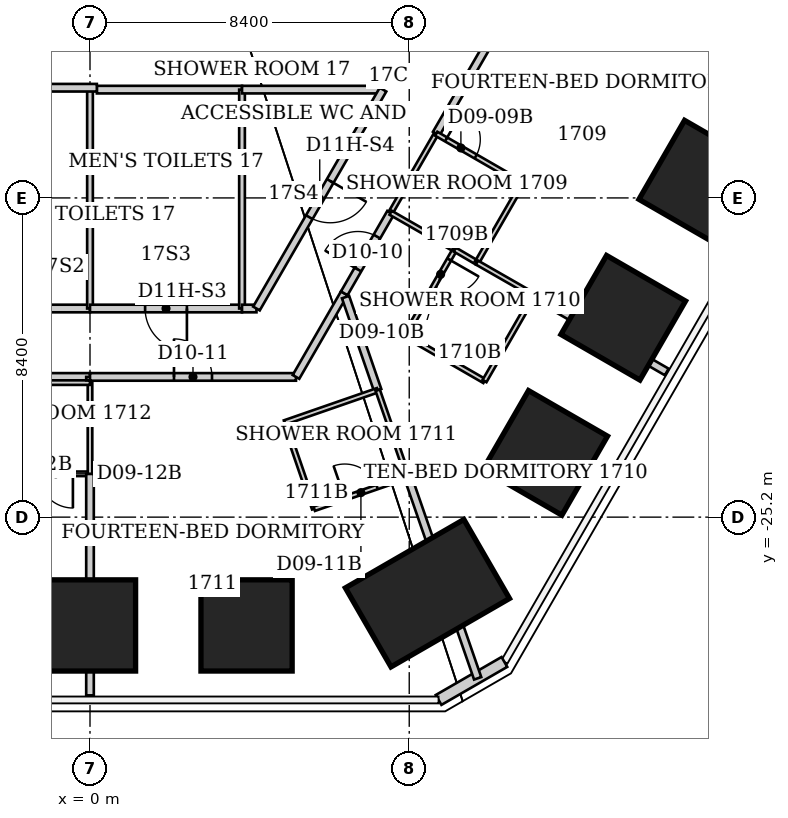
"""IFC4 building model, lengths in metres.
Left out: names, types, materials, properties, quantities, classifications, styles, units other than length and angle.
Written with IfcOpenShell. Run it as: python <this file> out.ifc"""

import sys

from ifc_helpers import new_model, si_unit, direction, frame, frame_2d, origin, origin_2d, place, context, subcontext, project, spatial, rectangle, extrude, element, fill, save


model = new_model("IFC4")
c1 = context("Model", 3, precision=1e-05, world=origin(), true_north=direction((0.0, 1.0)))
c2 = subcontext(c1, "Body", "Model", "MODEL_VIEW")
j1 = project(units=[si_unit("LENGTHUNIT", "METRE"), si_unit("PLANEANGLEUNIT", "RADIAN")], contexts=[c1])
p1 = place(None, origin())
s1 = spatial("IfcSite", under=j1, at=p1, CompositionType="ELEMENT")
p2 = place(p1, origin())
s2 = spatial("IfcBuilding", under=s1, at=p2, CompositionType="ELEMENT")
p3 = place(p2, frame((0.0, 0.0, 72.4)))
s3 = spatial("IfcBuildingStorey", under=s2, at=p3, CompositionType="ELEMENT", Elevation=72.4)
p4 = place(p3, frame((16.084, -16.398, 0.0), z_axis=(-0.026707189651, 0.027220789452, 0.999272612775), x_axis=(0.865695316087, -0.499221464256, 0.036736212807)))
e1 = element("IfcColumn", 1, at=p4, inside=s3, PredefinedType="COLUMN", context=c2, shape_type="SweptSolid", body=[
    extrude(rectangle(XDim=2.4, YDim=2.4, at=origin_2d()), origin(), (0.0, 0.0, 1.0), 3.803),
])
p5 = place(p3, frame((14.031, -19.953, 0.0), z_axis=(-0.02330242081, 0.033124102308, 0.999179558954), x_axis=(0.865853874056, -0.498946587993, 0.036733787066)))
e2 = element("IfcColumn", 2, at=p5, inside=s3, PredefinedType="COLUMN", context=c2, shape_type="SweptSolid", body=[
    extrude(rectangle(XDim=2.4, YDim=2.4, at=origin_2d()), origin(), (0.0, 0.0, 1.0), 3.803),
])
p6 = place(p3, frame((11.978, -23.509, 0.0), z_axis=(-0.019833251954, 0.038960465812, 0.999043905052), x_axis=(0.865703965576, -0.49921248457, 0.036654320816)))
e3 = element("IfcColumn", 3, at=p6, inside=s3, PredefinedType="COLUMN", context=c2, shape_type="SweptSolid", body=[
    extrude(rectangle(XDim=2.4, YDim=2.4, at=origin_2d()), origin(), (0.0, 0.0, 1.0), 3.804),
])
p7 = place(p3, frame((8.879, -27.202, 0.0), z_axis=(-0.014824030832, 0.0454346919, 0.998857315577), x_axis=(0.499731843942, -0.864917167509, 0.046758715743)))
e4 = element("IfcColumn", 4, at=p7, inside=s3, PredefinedType="COLUMN", context=c2, shape_type="SweptSolid", body=[
    extrude(rectangle(XDim=2.4, YDim=3.6, at=origin_2d()), origin(), (0.0, 0.0, 1.0), 3.804),
])
p8 = place(p3, frame((4.119, -28.05, 0.0), z_axis=(-0.006738664901, 0.045822921324, 0.998926849312), x_axis=(-0.00011331945, -0.9989495591, 0.045823198629)))
e5 = element("IfcColumn", 5, at=p8, inside=s3, PredefinedType="COLUMN", context=c2, shape_type="SweptSolid", body=[
    extrude(rectangle(XDim=2.4, YDim=2.4, at=origin_2d()), origin(), (0.0, 0.0, 1.0), 3.804),
])
p9 = place(p3, frame((0.0, -28.05, 0.0), z_axis=(0.0, 0.04588800593, 0.99894659062), x_axis=(0.0, -0.99894659062, 0.04588800593)))
e6 = element("IfcColumn", 6, at=p9, inside=s3, PredefinedType="COLUMN", context=c2, shape_type="SweptSolid", body=[
    extrude(rectangle(XDim=2.4, YDim=2.4, at=origin_2d()), origin(), (0.0, 0.0, 1.0), 3.804),
])
p10 = place(p3, frame((10.904, -29.011, 0.0), z_axis=(0.0, 0.0, 1.0), x_axis=(-0.866010750942, -0.50002537861, 0.0)))
e7 = element("IfcWall", 7, at=p10, inside=s3, PredefinedType="SOLIDWALL", context=c2, shape_type="SweptSolid", body=[
    extrude(rectangle(XDim=2.0, YDim=0.3, at=frame_2d((1.0, 0.0))), origin(), (0.0, 0.0, 1.0), 3.64),
])
p11 = place(p3, frame((-5.42, -21.51, 0.0), z_axis=(0.0, 0.0, 1.0), x_axis=(1.0, 0.0, 0.0)))
e8 = element("IfcWall", 8, at=p11, inside=s3, PredefinedType="PARTITIONING", context=c2, shape_type="SweptSolid", body=[
    extrude(rectangle(XDim=5.42, YDim=0.2, at=frame_2d((2.71, 0.0))), origin(), (0.0, 0.0, 1.0), 3.64),
])
p12 = place(p11, frame((1.71, 0.0, 0.0)))
e9 = element("IfcOpeningElement", 9, at=p12, cuts=e8, PredefinedType="OPENING", context=c2, shape_type="SweptSolid", body=[
    extrude(rectangle(XDim=1.0, YDim=2.13, at=frame_2d((0.5, 1.065))), frame((0.0, 0.1, 0.0), z_axis=(0.0, -1.0, 0.0), x_axis=(1.0, 0.0, 0.0)), (0.0, 0.0, 1.0), 0.2),
])
p13 = place(p3, frame((-2.6, -24.06, 0.0), z_axis=(0.0, 0.0, 1.0), x_axis=(1.0, 0.0, 0.0)))
e10 = element("IfcWall", 10, at=p13, inside=s3, PredefinedType="PARTITIONING", context=c2, shape_type="SweptSolid", body=[
    extrude(rectangle(XDim=2.6, YDim=0.12, at=frame_2d((1.3, 0.0))), origin(), (0.0, 0.0, 1.0), 3.64),
])
p14 = place(p13, frame((1.25, 0.0, 0.0)))
e11 = element("IfcOpeningElement", 11, at=p14, cuts=e10, PredefinedType="OPENING", context=c2, shape_type="SweptSolid", body=[
    extrude(rectangle(XDim=0.9, YDim=2.03, at=frame_2d((0.45, 1.015))), frame((0.0, 0.06, 0.0), z_axis=(0.0, -1.0, 0.0), x_axis=(1.0, 0.0, 0.0)), (0.0, 0.0, 1.0), 0.12),
])
p15 = place(p3, frame((0.0, -29.89, 0.0), z_axis=(0.0, 0.0, 1.0), x_axis=(0.0, 1.0, 0.0)))
e12 = element("IfcWall", 12, at=p15, inside=s3, PredefinedType="PARTITIONING", context=c2, shape_type="SweptSolid", body=[
    extrude(rectangle(XDim=5.83, YDim=0.2, at=frame_2d((2.915, 0.0))), origin(), (0.0, 0.0, 1.0), 2.86),
])
p16 = place(p3, frame((0.0, -24.06, 0.0), z_axis=(0.0, 0.0, 1.0), x_axis=(0.0, 1.0, 0.0)))
e13 = element("IfcWall", 13, at=p16, inside=s3, PredefinedType="PARTITIONING", context=c2, shape_type="SweptSolid", body=[
    extrude(rectangle(XDim=2.4, YDim=0.12, at=frame_2d((1.2, 0.0))), origin(), (0.0, 0.0, 1.0), 2.86),
])
p17 = place(p3, frame((0.0, -21.66, 0.0), z_axis=(0.0, 0.0, 1.0), x_axis=(-1.0, 0.0, 0.0)))
e14 = element("IfcWall", 14, at=p17, inside=s3, PredefinedType="PARTITIONING", context=c2, shape_type="SweptSolid", body=[
    extrude(rectangle(XDim=2.6, YDim=0.12, at=frame_2d((1.3, 0.0))), origin(), (0.0, 0.0, 1.0), 3.64),
])
p18 = place(p3, frame((0.0, -21.6, 0.0), z_axis=(0.0, 0.0, 1.0), x_axis=(0.0, 1.0, 0.0)))
e15 = element("IfcWall", 15, at=p18, inside=s3, PredefinedType="PARTITIONING", context=c2, shape_type="SweptSolid", body=[
    extrude(rectangle(XDim=0.09, YDim=0.2, at=frame_2d((0.045, 0.0))), origin(), (0.0, 0.0, 1.0), 3.64),
])
p19 = place(p3, frame((0.0, -21.51, 0.0), z_axis=(0.0, 0.0, 1.0), x_axis=(1.0, 0.0, 0.0)))
e16 = element("IfcWall", 16, at=p19, inside=s3, PredefinedType="PARTITIONING", context=c2, shape_type="SweptSolid", body=[
    extrude(rectangle(XDim=5.42, YDim=0.2, at=frame_2d((2.71, 0.0))), origin(), (0.0, 0.0, 1.0), 3.64),
])
p20 = place(p19, frame((2.21, 0.0, 0.0)))
e17 = element("IfcOpeningElement", 17, at=p20, cuts=e16, PredefinedType="OPENING", context=c2, shape_type="SweptSolid", body=[
    extrude(rectangle(XDim=1.0, YDim=2.13, at=frame_2d((0.5, 1.065))), frame((0.0, 0.1, 0.0), z_axis=(0.0, -1.0, 0.0), x_axis=(1.0, 0.0, 0.0)), (0.0, 0.0, 1.0), 0.2),
])
p21 = place(p3, frame((0.0, -19.71, 0.0), z_axis=(0.0, 0.0, 1.0), x_axis=(-1.0, 0.0, 0.0)))
e18 = element("IfcWall", 18, at=p21, inside=s3, PredefinedType="PARTITIONING", context=c2, shape_type="SweptSolid", body=[
    extrude(rectangle(XDim=4.0, YDim=0.2, at=frame_2d((2.0, 0.0))), origin(), (0.0, 0.0, 1.0), 3.64),
])
p22 = place(p3, frame((0.0, -13.95, 0.0), z_axis=(0.0, 0.0, 1.0), x_axis=(0.0, -1.0, 0.0)))
e19 = element("IfcWall", 19, at=p22, inside=s3, PredefinedType="PARTITIONING", context=c2, shape_type="SweptSolid", body=[
    extrude(rectangle(XDim=5.76, YDim=0.15, at=frame_2d((2.88, 0.0))), origin(), (0.0, 0.0, 1.0), 2.86),
])
p23 = place(p3, frame((0.18, -13.95, 0.0), z_axis=(0.0, 0.0, 1.0), x_axis=(1.0, 0.0, 0.0)))
e20 = element("IfcWall", 20, at=p23, inside=s3, PredefinedType="PARTITIONING", context=c2, shape_type="SweptSolid", body=[
    extrude(rectangle(XDim=3.82, YDim=0.2, at=frame_2d((1.91, 0.0))), origin(), (0.0, 0.0, 1.0), 3.64),
])
p24 = place(p3, frame((0.18, -13.9, 0.0), z_axis=(0.0, 0.0, 1.0), x_axis=(-1.0, 0.0, 0.0)))
e21 = element("IfcWall", 21, at=p24, inside=s3, PredefinedType="PARTITIONING", context=c2, shape_type="SweptSolid", body=[
    extrude(rectangle(XDim=7.97, YDim=0.2, at=frame_2d((3.985, 0.0))), origin(), (0.0, 0.0, 1.0), 3.64),
])
p25 = place(p24, frame((3.035, 0.0, 0.0)))
e22 = element("IfcOpeningElement", 22, at=p25, cuts=e21, PredefinedType="OPENING", context=c2, shape_type="SweptSolid", body=[
    extrude(rectangle(XDim=1.1, YDim=2.2, at=frame_2d((0.55, 1.1))), frame((0.0, 0.1, 0.0), z_axis=(0.0, -1.0, 0.0), x_axis=(1.0, 0.0, 0.0)), (0.0, 0.0, 1.0), 0.2),
])
p26 = place(p3, frame((4.0, -19.71, 0.0), z_axis=(0.0, 0.0, 1.0), x_axis=(-1.0, 0.0, 0.0)))
e23 = element("IfcWall", 23, at=p26, inside=s3, PredefinedType="PARTITIONING", context=c2, shape_type="SweptSolid", body=[
    extrude(rectangle(XDim=4.0, YDim=0.2, at=frame_2d((2.0, 0.0))), origin(), (0.0, 0.0, 1.0), 3.64),
])
p27 = place(p26, frame((1.45, 0.0, 0.0)))
e24 = element("IfcOpeningElement", 24, at=p27, cuts=e23, PredefinedType="OPENING", context=c2, shape_type="SweptSolid", body=[
    extrude(rectangle(XDim=1.1, YDim=2.2, at=frame_2d((0.55, 1.1))), frame((0.0, 0.1, 0.0), z_axis=(0.0, -1.0, 0.0), x_axis=(1.0, 0.0, 0.0)), (0.0, 0.0, 1.0), 0.2),
])
p28 = place(p3, frame((4.0, -13.95, 0.0), z_axis=(0.0, 0.0, 1.0), x_axis=(0.0, -1.0, 0.0)))
e25 = element("IfcWall", 25, at=p28, inside=s3, PredefinedType="PARTITIONING", context=c2, shape_type="SweptSolid", body=[
    extrude(rectangle(XDim=5.76, YDim=0.15, at=frame_2d((2.88, 0.0))), origin(), (0.0, 0.0, 1.0), 2.878),
])
p29 = place(p3, frame((4.0, -13.95, 0.0), z_axis=(0.0, 0.0, 1.0), x_axis=(1.0, 0.0, 0.0)))
e26 = element("IfcWall", 26, at=p29, inside=s3, PredefinedType="PARTITIONING", context=c2, shape_type="SweptSolid", body=[
    extrude(rectangle(XDim=3.635, YDim=0.2, at=frame_2d((1.817, 0.0))), origin(), (0.0, 0.0, 1.0), 3.64),
])
p30 = place(p3, frame((4.38, -19.71, 0.0), z_axis=(0.0, 0.0, 1.0), x_axis=(-1.0, 0.0, 0.0)))
e27 = element("IfcWall", 27, at=p30, inside=s3, PredefinedType="PARTITIONING", context=c2, shape_type="SweptSolid", body=[
    extrude(rectangle(XDim=0.38, YDim=0.2, at=frame_2d((0.19, 0.0))), origin(), (0.0, 0.0, 1.0), 3.64),
])
p31 = place(p3, frame((5.12, -22.71, 0.0), z_axis=(0.0, 0.0, 1.0), x_axis=(0.324880771143, -0.945754981241, 0.0)))
e28 = element("IfcWall", 28, at=p31, inside=s3, PredefinedType="PARTITIONING", context=c2, shape_type="SweptSolid", body=[
    extrude(rectangle(XDim=2.4, YDim=0.12, at=frame_2d((1.2, 0.0))), origin(), (0.0, 0.0, 1.0), 3.64),
])
p32 = place(p3, frame((5.42, -21.51, 0.0), z_axis=(0.0, 0.0, 1.0), x_axis=(0.499963722229, 0.866046347752, 0.0)))
e29 = element("IfcWall", 29, at=p32, inside=s3, PredefinedType="PARTITIONING", context=c2, shape_type="SweptSolid", body=[
    extrude(rectangle(XDim=2.54, YDim=0.2, at=frame_2d((1.27, 0.0))), origin(), (0.0, 0.0, 1.0), 3.64),
])
p33 = place(p3, frame((5.9, -24.98, 0.0), z_axis=(0.0, 0.0, 1.0), x_axis=(0.945165466094, 0.326591857987, 0.0)))
e30 = element("IfcWall", 30, at=p33, inside=s3, PredefinedType="PARTITIONING", context=c2, shape_type="SweptSolid", body=[
    extrude(rectangle(XDim=2.603, YDim=0.12, at=frame_2d((1.302, 0.0))), origin(), (0.0, 0.0, 1.0), 3.64),
])
p34 = place(p33, frame((0.85, 0.0, 0.0)))
e31 = element("IfcOpeningElement", 31, at=p34, cuts=e30, PredefinedType="OPENING", context=c2, shape_type="SweptSolid", body=[
    extrude(rectangle(XDim=0.9, YDim=2.03, at=frame_2d((0.45, 1.015))), frame((0.0, 0.06, 0.0), z_axis=(0.0, -1.0, 0.0), x_axis=(1.0, 0.0, 0.0)), (0.0, 0.0, 1.0), 0.12),
])
p35 = place(p3, frame((6.69, -19.31, 0.0), z_axis=(0.0, 0.0, 1.0), x_axis=(0.498748634132, 0.866746675766, 0.0)))
e32 = element("IfcWall", 32, at=p35, inside=s3, PredefinedType="PARTITIONING", context=c2, shape_type="SweptSolid", body=[
    extrude(rectangle(XDim=2.446, YDim=0.2, at=frame_2d((1.223, 0.0))), origin(), (0.0, 0.0, 1.0), 3.64),
])
p36 = place(p35, frame((0.723, 0.0, 0.0)))
e33 = element("IfcOpeningElement", 33, at=p36, cuts=e32, PredefinedType="OPENING", context=c2, shape_type="SweptSolid", body=[
    extrude(rectangle(XDim=1.0, YDim=2.13, at=frame_2d((0.5, 1.065))), frame((0.0, 0.1, 0.0), z_axis=(0.0, -1.0, 0.0), x_axis=(1.0, 0.0, 0.0)), (0.0, 0.0, 1.0), 0.2),
])
p37 = place(p3, frame((6.724, -19.409, 0.0), z_axis=(0.0, 0.0, 1.0), x_axis=(0.326182205696, -0.945306917719, 0.0)))
e34 = element("IfcWall", 34, at=p37, inside=s3, PredefinedType="PARTITIONING", context=c2, shape_type="SweptSolid", body=[
    extrude(rectangle(XDim=2.593, YDim=0.2, at=frame_2d((1.296, 0.0))), origin(), (0.0, 0.0, 1.0), 3.64),
])
p38 = place(p3, frame((7.57, -21.86, 0.0), z_axis=(0.0, 0.0, 1.0), x_axis=(-0.944782191137, -0.327698964463, 0.0)))
e35 = element("IfcWall", 35, at=p38, inside=s3, PredefinedType="PARTITIONING", context=c2, shape_type="SweptSolid", body=[
    extrude(rectangle(XDim=2.594, YDim=0.12, at=frame_2d((1.297, 0.0))), origin(), (0.0, 0.0, 1.0), 3.64),
])
p39 = place(p3, frame((7.57, -21.86, 0.0), z_axis=(0.0, 0.0, 1.0), x_axis=(0.327706459026, -0.944779591605, 0.0)))
e36 = element("IfcWall", 36, at=p39, inside=s3, PredefinedType="PARTITIONING", context=c2, shape_type="SweptSolid", body=[
    extrude(rectangle(XDim=2.35, YDim=0.12, at=frame_2d((1.175, 0.0))), origin(), (0.0, 0.0, 1.0), 3.64),
])
p40 = place(p3, frame((7.71, -13.95, 0.0), z_axis=(0.0, 0.0, 1.0), x_axis=(-0.500511113963, -0.865730110831, 0.0)))
e37 = element("IfcWall", 37, at=p40, inside=s3, PredefinedType="PARTITIONING", context=c2, shape_type="SweptSolid", body=[
    extrude(rectangle(XDim=6.653, YDim=0.2, at=frame_2d((3.327, 0.0))), origin(), (0.0, 0.0, 1.0), 3.64),
])
p41 = place(p40, frame((2.777, 0.0, 0.0)))
e38 = element("IfcOpeningElement", 38, at=p41, cuts=e37, PredefinedType="OPENING", context=c2, shape_type="SweptSolid", body=[
    extrude(rectangle(XDim=1.1, YDim=2.2, at=frame_2d((0.55, 1.1))), frame((0.0, 0.1, 0.0), z_axis=(0.0, -1.0, 0.0), x_axis=(1.0, 0.0, 0.0)), (0.0, 0.0, 1.0), 0.2),
])
p42 = place(p3, frame((7.91, -17.19, 0.0), z_axis=(0.0, 0.0, 1.0), x_axis=(0.499737123639, 0.866177122335, 0.0)))
e39 = element("IfcWall", 39, at=p42, inside=s3, PredefinedType="PARTITIONING", context=c2, shape_type="SweptSolid", body=[
    extrude(rectangle(XDim=2.401, YDim=0.12, at=frame_2d((1.201, 0.0))), origin(), (0.0, 0.0, 1.0), 3.64),
])
p43 = place(p3, frame((7.91, -17.19, 0.0), z_axis=(0.0, 0.0, 1.0), x_axis=(0.8673242112, -0.497743621421, 0.0)))
e40 = element("IfcWall", 40, at=p43, inside=s3, PredefinedType="PARTITIONING", context=c2, shape_type="SweptSolid", body=[
    extrude(rectangle(XDim=1.949, YDim=0.12, at=frame_2d((0.974, 0.0))), origin(), (0.0, 0.0, 1.0), 3.64),
])
p44 = place(p3, frame((8.3, -20.42, 0.0), z_axis=(0.0, 0.0, 1.0), x_axis=(0.866177122335, -0.499737123639, 0.0)))
e41 = element("IfcWall", 41, at=p44, inside=s3, PredefinedType="PARTITIONING", context=c2, shape_type="SweptSolid", body=[
    extrude(rectangle(XDim=2.401, YDim=0.12, at=frame_2d((1.201, 0.0))), origin(), (0.0, 0.0, 1.0), 3.64),
])
p45 = place(p3, frame((8.36, -24.13, 0.0), z_axis=(0.0, 0.0, 1.0), x_axis=(0.327332811485, -0.944909112309, 0.0)))
e42 = element("IfcWall", 42, at=p45, inside=s3, PredefinedType="PARTITIONING", context=c2, shape_type="SweptSolid", body=[
    extrude(rectangle(XDim=5.621, YDim=0.2, at=frame_2d((2.811, 0.0))), origin(), (0.0, 0.0, 1.0), 3.64),
])
p46 = place(p3, frame((9.11, -15.11, 0.0), z_axis=(0.0, 0.0, 1.0), x_axis=(0.50119856319, 0.865332306259, 0.0)))
e43 = element("IfcWall", 43, at=p46, inside=s3, PredefinedType="PARTITIONING", context=c2, shape_type="SweptSolid", body=[
    extrude(rectangle(XDim=6.345, YDim=0.2, at=frame_2d((3.172, 0.0))), origin(), (0.0, 0.0, 1.0), 3.64),
])
p47 = place(p46, frame((2.672, 0.0, 0.0)))
e44 = element("IfcOpeningElement", 44, at=p47, cuts=e43, PredefinedType="OPENING", context=c2, shape_type="SweptSolid", body=[
    extrude(rectangle(XDim=1.0, YDim=2.13, at=frame_2d((0.5, 1.065))), frame((0.0, 0.1, 0.0), z_axis=(0.0, -1.0, 0.0), x_axis=(1.0, 0.0, 0.0)), (0.0, 0.0, 1.0), 0.2),
])
p48 = place(p3, frame((9.6, -18.16, 0.0), z_axis=(0.0, 0.0, 1.0), x_axis=(-0.498627694264, -0.866816256489, 0.0)))
e45 = element("IfcWall", 45, at=p48, inside=s3, PredefinedType="PARTITIONING", context=c2, shape_type="SweptSolid", body=[
    extrude(rectangle(XDim=2.607, YDim=0.12, at=frame_2d((1.304, 0.0))), origin(), (0.0, 0.0, 1.0), 3.64),
])
p49 = place(p48, frame((0.3, 0.0, 0.0)))
e46 = element("IfcOpeningElement", 46, at=p49, cuts=e45, PredefinedType="OPENING", context=c2, shape_type="SweptSolid", body=[
    extrude(rectangle(XDim=0.9, YDim=2.03, at=frame_2d((0.45, 1.015))), frame((0.0, 0.06, 0.0), z_axis=(0.0, -1.0, 0.0), x_axis=(1.0, 0.0, 0.0)), (0.0, 0.0, 1.0), 0.12),
])
p50 = place(p3, frame((9.6, -18.16, 0.0), z_axis=(0.0, 0.0, 1.0), x_axis=(0.862577739272, -0.505924543497, 0.0)))
e47 = element("IfcWall", 47, at=p50, inside=s3, PredefinedType="PARTITIONING", context=c2, shape_type="SweptSolid", body=[
    extrude(rectangle(XDim=0.672, YDim=0.12, at=frame_2d((0.336, 0.0))), origin(), (0.0, 0.0, 1.0), 3.64),
])
p51 = place(p3, frame((10.18, -18.5, 0.0), z_axis=(0.0, 0.0, 1.0), x_axis=(0.499693115345, 0.866202511239, 0.0)))
e48 = element("IfcWall", 48, at=p51, inside=s3, PredefinedType="PARTITIONING", context=c2, shape_type="SweptSolid", body=[
    extrude(rectangle(XDim=2.401, YDim=0.12, at=frame_2d((1.201, 0.0))), origin(), (0.0, 0.0, 1.0), 3.64),
])
p52 = place(p3, frame((10.18, -18.5, 0.0), z_axis=(0.0, 0.0, 1.0), x_axis=(0.867564547129, -0.497324598794, 0.0)))
e49 = element("IfcWall", 49, at=p52, inside=s3, PredefinedType="PARTITIONING", context=c2, shape_type="SweptSolid", body=[
    extrude(rectangle(XDim=1.729, YDim=0.12, at=frame_2d((0.865, 0.0))), origin(), (0.0, 0.0, 1.0), 3.64),
])
p53 = place(p3, frame((10.38, -21.62, 0.0), z_axis=(0.0, 0.0, 1.0), x_axis=(0.498627694264, 0.866816256489, 0.0)))
e50 = element("IfcWall", 50, at=p53, inside=s3, PredefinedType="PARTITIONING", context=c2, shape_type="SweptSolid", body=[
    extrude(rectangle(XDim=2.607, YDim=0.12, at=frame_2d((1.304, 0.0))), origin(), (0.0, 0.0, 1.0), 3.64),
])
p54 = place(p3, frame((11.38, -16.42, 0.0), z_axis=(0.0, 0.0, 1.0), x_axis=(-0.866154567199, 0.49977621564, 0.0)))
e51 = element("IfcWall", 51, at=p54, inside=s3, PredefinedType="PARTITIONING", context=c2, shape_type="SweptSolid", body=[
    extrude(rectangle(XDim=2.621, YDim=0.12, at=frame_2d((1.311, 0.0))), origin(), (0.0, 0.0, 1.0), 3.64),
])
p55 = place(p54, frame((1.421, 0.0, 0.0)))
e52 = element("IfcOpeningElement", 52, at=p55, cuts=e51, PredefinedType="OPENING", context=c2, shape_type="SweptSolid", body=[
    extrude(rectangle(XDim=0.9, YDim=2.03, at=frame_2d((0.45, 1.015))), frame((0.0, 0.06, 0.0), z_axis=(0.0, -1.0, 0.0), x_axis=(1.0, 0.0, 0.0)), (0.0, 0.0, 1.0), 0.12),
])
p56 = place(p3, frame((11.68, -19.36, 0.0), z_axis=(0.0, 0.0, 1.0), x_axis=(0.865885444553, -0.500242338183, 0.0)))
e53 = element("IfcWall", 53, at=p56, inside=s3, PredefinedType="PARTITIONING", context=c2, shape_type="SweptSolid", body=[
    extrude(rectangle(XDim=4.038, YDim=0.2, at=frame_2d((2.019, 0.0))), origin(), (0.0, 0.0, 1.0), 3.64),
])
p57 = place(p3, frame((14.56, -10.931, 0.0), z_axis=(0.0, 0.0, 1.0), x_axis=(0.865995646508, -0.500051537573, 0.0)))
e54 = element("IfcWall", 54, at=p57, inside=s3, PredefinedType="PARTITIONING", context=c2, shape_type="SweptSolid", body=[
    extrude(rectangle(XDim=5.758, YDim=0.2, at=frame_2d((2.879, 0.0))), origin(), (0.0, 0.0, 1.0), 3.64),
])
p58 = place(p55, origin())
e55 = element("IfcDoor", 55, at=p58, inside=s3, OperationType="SINGLE_SWING_RIGHT", PredefinedType="DOOR", context=c2, shape_type="SweptSolid", body=[
    extrude(rectangle(XDim=0.9, YDim=2.03, at=frame_2d((0.45, 1.015))), frame((0.0, 0.025, 0.0), z_axis=(0.0, -1.0, 0.0), x_axis=(1.0, 0.0, 0.0)), (0.0, 0.0, 1.0), 0.05),
])
fill(e52, e55)
p59 = place(p36, origin())
e56 = element("IfcDoor", 56, at=p59, inside=s3, OperationType="SINGLE_SWING_LEFT", PredefinedType="DOOR", context=c2, shape_type="SweptSolid", body=[
    extrude(rectangle(XDim=1.0, YDim=2.13, at=frame_2d((0.5, 1.065))), frame((0.0, 0.025, 0.0), z_axis=(0.0, -1.0, 0.0), x_axis=(1.0, 0.0, 0.0)), (0.0, 0.0, 1.0), 0.05),
])
fill(e33, e56)
p60 = place(p49, origin())
e57 = element("IfcDoor", 57, at=p60, inside=s3, OperationType="SINGLE_SWING_LEFT", PredefinedType="DOOR", context=c2, shape_type="SweptSolid", body=[
    extrude(rectangle(XDim=0.9, YDim=2.03, at=frame_2d((0.45, 1.015))), frame((0.0, 0.025, 0.0), z_axis=(0.0, -1.0, 0.0), x_axis=(1.0, 0.0, 0.0)), (0.0, 0.0, 1.0), 0.05),
])
fill(e46, e57)
p61 = place(p20, origin())
e58 = element("IfcDoor", 58, at=p61, inside=s3, OperationType="SINGLE_SWING_LEFT", PredefinedType="DOOR", context=c2, shape_type="SweptSolid", body=[
    extrude(rectangle(XDim=1.0, YDim=2.13, at=frame_2d((0.5, 1.065))), frame((0.0, 0.025, 0.0), z_axis=(0.0, -1.0, 0.0), x_axis=(1.0, 0.0, 0.0)), (0.0, 0.0, 1.0), 0.05),
])
fill(e17, e58)
p62 = place(p34, origin())
e59 = element("IfcDoor", 59, at=p62, inside=s3, OperationType="SINGLE_SWING_LEFT", PredefinedType="DOOR", context=c2, shape_type="SweptSolid", body=[
    extrude(rectangle(XDim=0.9, YDim=2.03, at=frame_2d((0.45, 1.015))), frame((0.0, 0.025, 0.0), z_axis=(0.0, -1.0, 0.0), x_axis=(1.0, 0.0, 0.0)), (0.0, 0.0, 1.0), 0.05),
])
fill(e31, e59)
p63 = place(p14, origin())
e60 = element("IfcDoor", 60, at=p63, inside=s3, OperationType="SINGLE_SWING_RIGHT", PredefinedType="DOOR", context=c2, shape_type="SweptSolid", body=[
    extrude(rectangle(XDim=0.9, YDim=2.03, at=frame_2d((0.45, 1.015))), frame((0.0, 0.025, 0.0), z_axis=(0.0, -1.0, 0.0), x_axis=(1.0, 0.0, 0.0)), (0.0, 0.0, 1.0), 0.05),
])
fill(e11, e60)
p64 = place(p27, origin())
e61 = element("IfcDoor", 61, at=p64, inside=s3, OperationType="SINGLE_SWING_LEFT", PredefinedType="DOOR", context=c2, shape_type="SweptSolid", body=[
    extrude(rectangle(XDim=1.1, YDim=2.2, at=frame_2d((0.55, 1.1))), frame((0.0, 0.025, 0.0), z_axis=(0.0, -1.0, 0.0), x_axis=(1.0, 0.0, 0.0)), (0.0, 0.0, 1.0), 0.05),
])
fill(e24, e61)
p65 = place(p41, origin())
e62 = element("IfcDoor", 62, at=p65, inside=s3, OperationType="SINGLE_SWING_LEFT", PredefinedType="DOOR", context=c2, shape_type="SweptSolid", body=[
    extrude(rectangle(XDim=1.1, YDim=2.2, at=frame_2d((0.55, 1.1))), frame((0.0, 0.025, 0.0), z_axis=(0.0, -1.0, 0.0), x_axis=(1.0, 0.0, 0.0)), (0.0, 0.0, 1.0), 0.05),
])
fill(e38, e62)
save(model, sys.argv[1])
